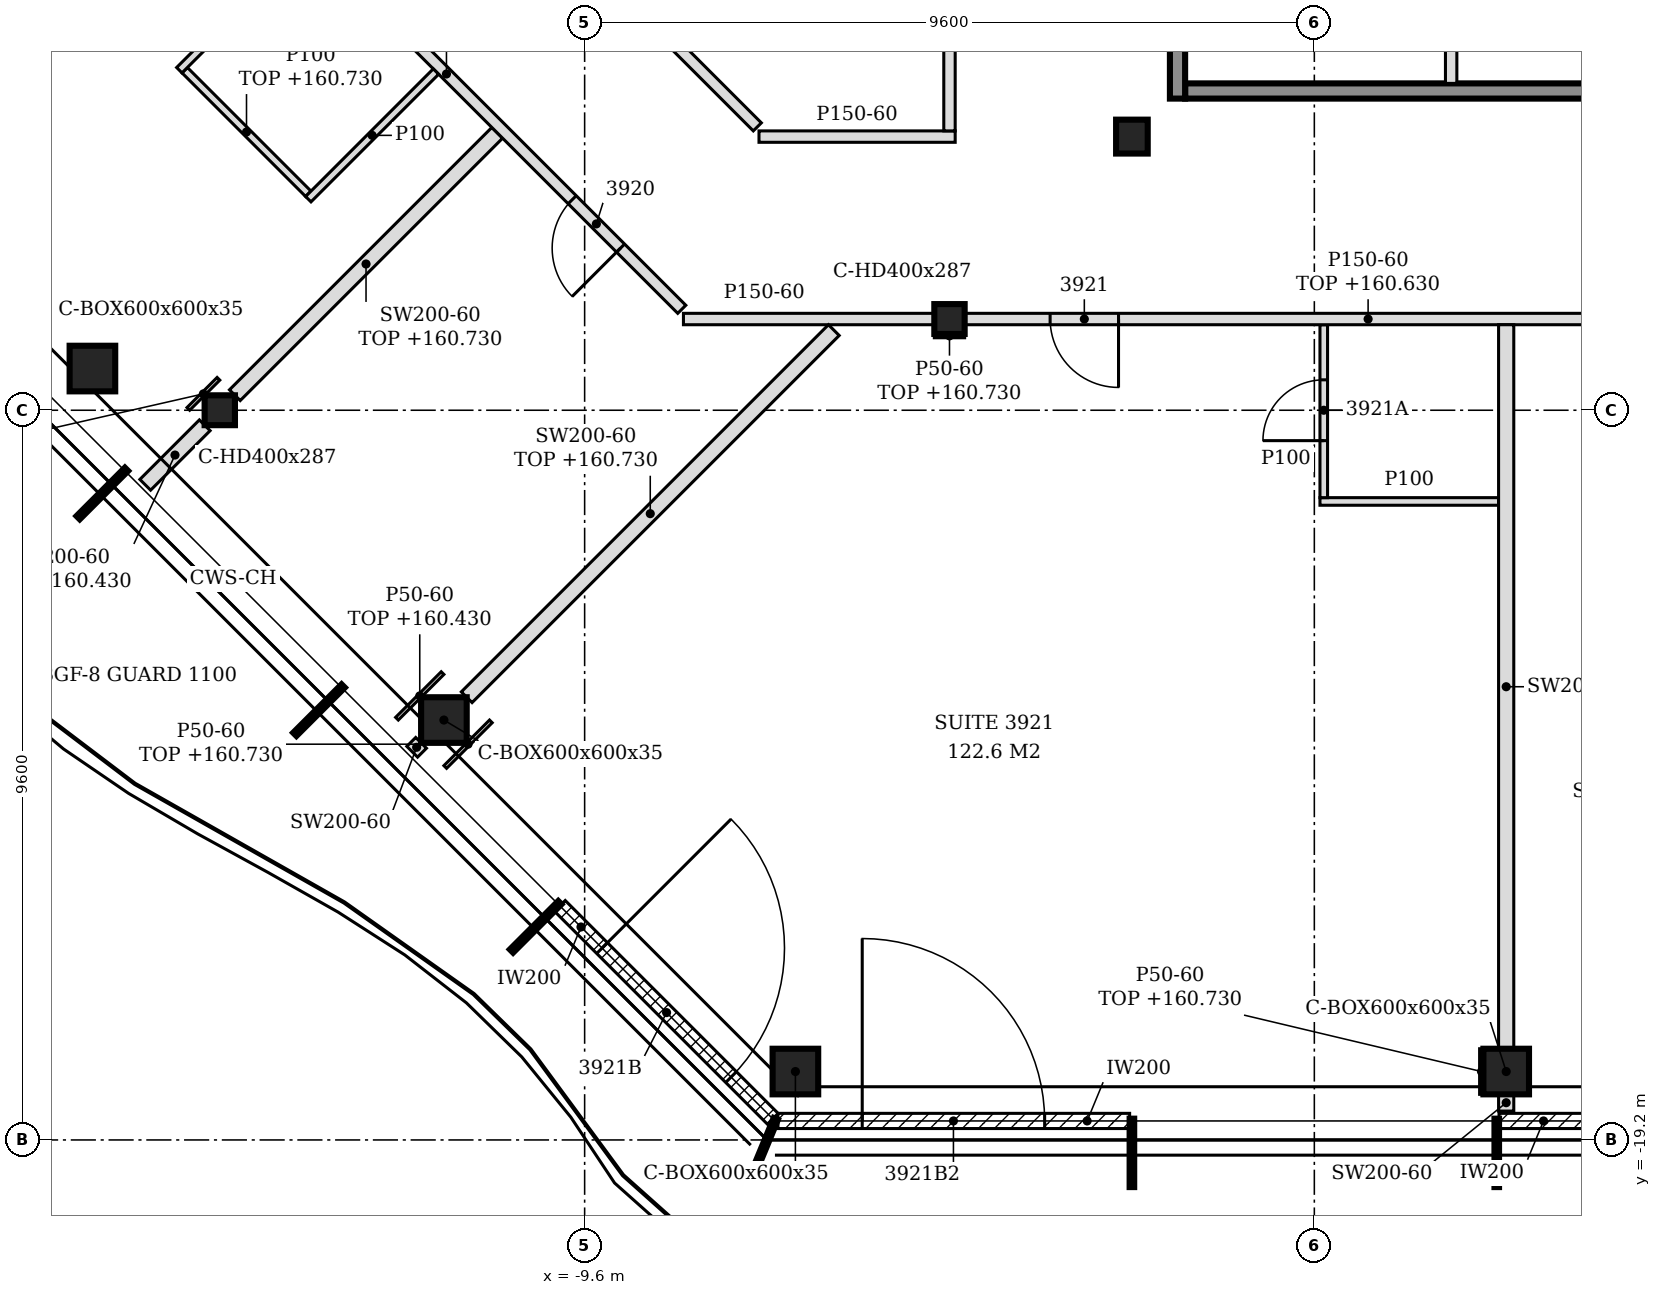
"""IFC4 building model, lengths in metres.
Left out: names, types, materials, properties, quantities, classifications, styles, units other than length and angle.
Written with IfcOpenShell. Run it as: python <this file> out.ifc"""

import sys

from ifc_helpers import new_model, si_unit, direction, frame, frame_2d, origin, origin_2d, place, context, subcontext, project, spatial, polyline, rectangle, hollow_rectangle, i_section, outline, extrude, element, fill, save


model = new_model("IFC4")
c1 = context("Model", 3, precision=1e-05, world=origin(), true_north=direction((0.0, 1.0)))
c2 = subcontext(c1, "Body", "Model", "MODEL_VIEW")
j1 = project(units=[si_unit("LENGTHUNIT", "METRE"), si_unit("PLANEANGLEUNIT", "RADIAN")], contexts=[c1])
p1 = place(None, origin())
s1 = spatial("IfcSite", under=j1, at=p1, CompositionType="ELEMENT")
p2 = place(p1, origin())
s2 = spatial("IfcBuilding", under=s1, at=p2, CompositionType="ELEMENT")
p3 = place(p2, frame((0.0, 0.0, 157.8)))
s3 = spatial("IfcBuildingStorey", under=s2, at=p3, CompositionType="ELEMENT", Elevation=157.8)
for number, where, z_axis, x_axis in (
    (1, (-6.827, -18.3, -0.15), (0.0, 0.0, 1.0), (1.0, 0.0, 0.0)),
    (2, (2.524, -18.3, -0.15), (0.0, 0.0, 1.0), (1.0, 0.0, 0.0)),
    (3, (-16.076, -9.052, -0.15), (0.0, 0.0, 1.0), (1.0, 0.0, 0.0)),
    (4, (-11.451, -13.676, -0.15), (0.0, 0.0, 1.0), (1.0, 0.0, 0.0)),
):
    element("IfcColumn", number, at=place(p3, frame(where, z_axis=z_axis, x_axis=x_axis)), inside=s3, PredefinedType="COLUMN", context=c2, shape_type="SweptSolid", body=[
        extrude(hollow_rectangle(XDim=0.6, YDim=0.6, WallThickness=0.035, at=origin_2d()), origin(), (0.0, 0.0, 1.0), 3.6),
    ])
p4 = place(p3, frame((-4.8, -8.4, -0.15), z_axis=(0.0, 0.0, 1.0), x_axis=(1.0, 0.0, 0.0)))
e5 = element("IfcColumn", 5, at=p4, inside=s3, PredefinedType="COLUMN", context=c2, shape_type="SweptSolid", body=[
    extrude(i_section(OverallWidth=0.399, OverallDepth=0.393, WebThickness=0.023, FlangeThickness=0.037, FilletRadius=0.015, at=origin_2d()), origin(), (0.0, 0.0, 1.0), 3.6),
])
p5 = place(p3, frame((-2.4, -6.0, -0.15), z_axis=(0.0, 0.0, 1.0), x_axis=(1.0, 0.0, 0.0)))
e6 = element("IfcColumn", 6, at=p5, inside=s3, PredefinedType="COLUMN", context=c2, shape_type="SweptSolid", body=[
    extrude(i_section(OverallWidth=0.416, OverallDepth=0.446, WebThickness=0.039, FlangeThickness=0.063, FilletRadius=0.015, at=origin_2d()), origin(), (0.0, 0.0, 1.0), 3.6),
])
p6 = place(p3, frame((-14.4, -9.6, -0.15), z_axis=(0.0, 0.0, 1.0), x_axis=(1.0, 0.0, 0.0)))
e7 = element("IfcColumn", 7, at=p6, inside=s3, PredefinedType="COLUMN", context=c2, shape_type="SweptSolid", body=[
    extrude(i_section(OverallWidth=0.399, OverallDepth=0.393, WebThickness=0.023, FlangeThickness=0.037, FilletRadius=0.015, at=origin_2d()), origin(), (0.0, 0.0, 1.0), 3.6),
])
p7 = place(p3, frame((-7.056, -18.95, 0.0), z_axis=(0.0, 0.0, 1.0), x_axis=(1.0, 0.0, 0.0)))
e8 = element("IfcWall", 8, at=p7, inside=s3, PredefinedType="NOTDEFINED", context=c2, shape_type="SweptSolid", body=[
    extrude(rectangle(XDim=4.626, YDim=0.2, at=frame_2d((2.313, 0.0))), origin(), (0.0, 0.0, 1.0), 3.45),
])
p8 = place(p7, frame((1.108, 0.0, 0.0)))
e9 = element("IfcOpeningElement", 9, at=p8, cuts=e8, PredefinedType="OPENING", context=c2, shape_type="SweptSolid", body=[
    extrude(rectangle(XDim=2.4, YDim=2.4, at=frame_2d((1.2, 1.2))), frame((0.0, 0.11, 0.0), z_axis=(0.0, -1.0, 0.0), x_axis=(1.0, 0.0, 0.0)), (0.0, 0.0, 1.0), 0.22),
])
p9 = place(p3, frame((2.43, -18.95, 0.0), z_axis=(0.0, 0.0, 1.0), x_axis=(1.0, 0.0, 0.0)))
e10 = element("IfcWall", 10, at=p9, inside=s3, PredefinedType="NOTDEFINED", context=c2, shape_type="SweptSolid", body=[
    extrude(rectangle(XDim=4.74, YDim=0.2, at=frame_2d((2.37, 0.0))), origin(), (0.0, 0.0, 1.0), 3.45),
])
p10 = place(p9, frame((1.17, 0.0, 0.0)))
e11 = element("IfcOpeningElement", 11, at=p10, cuts=e10, PredefinedType="OPENING", context=c2, shape_type="SweptSolid", body=[
    extrude(rectangle(XDim=2.4, YDim=2.4, at=frame_2d((1.2, 1.2))), frame((0.0, 0.11, 0.0), z_axis=(0.0, -1.0, 0.0), x_axis=(1.0, 0.0, 0.0)), (0.0, 0.0, 1.0), 0.22),
])
p11 = place(p3, frame((-9.926, -16.121, 0.0), z_axis=(0.0, 0.0, 1.0), x_axis=(0.707137595296, -0.707075965734, 0.0)))
e12 = element("IfcWall", 12, at=p11, inside=s3, PredefinedType="NOTDEFINED", context=c2, shape_type="SweptSolid", body=[
    extrude(rectangle(XDim=3.961, YDim=0.2, at=frame_2d((1.981, 0.0))), origin(), (0.0, 0.0, 1.0), 3.45),
])
p12 = place(p11, frame((0.786, 0.0, 0.0)))
e13 = element("IfcOpeningElement", 13, at=p12, cuts=e12, PredefinedType="OPENING", context=c2, shape_type="SweptSolid", body=[
    extrude(rectangle(XDim=2.4, YDim=2.4, at=frame_2d((1.2, 1.2))), frame((0.0, 0.11, 0.0), z_axis=(0.0, -1.0, 0.0), x_axis=(1.0, 0.0, 0.0)), (0.0, 0.0, 1.0), 0.22),
])
p13 = place(p3, frame((-1.7, -5.4, 0.0), z_axis=(0.0, 0.0, 1.0), x_axis=(1.0, 0.0, 0.0)))
e14 = element("IfcWall", 14, at=p13, inside=s3, PredefinedType="SOLIDWALL", context=c2, shape_type="SweptSolid", body=[
    extrude(rectangle(XDim=7.9, YDim=0.2, at=frame_2d((3.95, 0.0))), origin(), (0.0, 0.0, 1.0), 3.45),
])
p14 = place(p3, frame((-1.8, -5.5, 0.0), z_axis=(0.0, 0.0, 1.0), x_axis=(0.0, 1.0, 0.0)))
e15 = element("IfcWall", 15, at=p14, inside=s3, PredefinedType="SOLIDWALL", context=c2, shape_type="SweptSolid", body=[
    extrude(rectangle(XDim=15.8, YDim=0.2, at=frame_2d((7.9, 0.0))), origin(), (0.0, 0.0, 1.0), 3.45),
])
p15 = place(p14, frame((3.05, 0.0, 0.0)))
e16 = element("IfcOpeningElement", 16, at=p15, cuts=e15, PredefinedType="OPENING", context=c2, shape_type="SweptSolid", body=[
    extrude(rectangle(XDim=1.3, YDim=2.1, at=frame_2d((0.65, 1.05))), frame((0.0, 0.11, 0.0), z_axis=(0.0, -1.0, 0.0), x_axis=(1.0, 0.0, 0.0)), (0.0, 0.0, 1.0), 0.22),
])
p16 = place(p14, frame((11.45, 0.0, 0.0)))
e17 = element("IfcOpeningElement", 17, at=p16, cuts=e15, PredefinedType="OPENING", context=c2, shape_type="SweptSolid", body=[
    extrude(rectangle(XDim=1.3, YDim=2.1, at=frame_2d((0.65, 1.05))), frame((0.0, 0.11, 0.0), z_axis=(0.0, -1.0, 0.0), x_axis=(1.0, 0.0, 0.0)), (0.0, 0.0, 1.0), 0.22),
])
p17 = place(p3, frame((1.8, -5.3, 0.0), z_axis=(0.0, 0.0, 1.0), x_axis=(0.0, 1.0, 0.0)))
e18 = element("IfcWall", 18, at=p17, inside=s3, PredefinedType="PARTITIONING", context=c2, shape_type="SweptSolid", body=[
    extrude(rectangle(XDim=2.525, YDim=0.15, at=frame_2d((1.263, 0.0))), origin(), (0.0, 0.0, 1.0), 3.45),
])
p18 = place(p3, frame((2.524, -18.82, 0.0), z_axis=(0.0, 0.0, 1.0), x_axis=(0.0, 1.0, 0.0)))
e19 = element("IfcWall", 19, at=p18, inside=s3, PredefinedType="PARTITIONING", context=c2, shape_type="SweptSolid", body=[
    extrude(rectangle(XDim=0.22, YDim=0.2, at=frame_2d((0.11, 0.0))), origin(), (0.0, 0.0, 1.0), 3.45),
])
p19 = place(p3, frame((2.524, -18.0, 0.0), z_axis=(0.0, 0.0, 1.0), x_axis=(0.0, 1.0, 0.0)))
e20 = element("IfcWall", 20, at=p19, inside=s3, PredefinedType="PARTITIONING", context=c2, shape_type="SweptSolid", body=[
    extrude(outline(polyline([(0.0, 0.0), (9.525, 0.0), (9.525, 2.83), (9.45, 2.83), (9.448, 3.45), (3.705, 3.45), (3.703, 2.88), (3.495, 2.88), (3.493, 3.45), (0.0, 3.45), (0.0, 0.0)])), frame((0.0, 0.1, 0.0), z_axis=(0.0, -1.0, 0.0), x_axis=(1.0, 0.0, 0.0)), (0.0, 0.0, 1.0), 0.2),
])
p20 = place(p3, frame((-11.869, -14.093, 0.0), z_axis=(0.0, 0.0, 1.0), x_axis=(0.707106781187, 0.707106781187, 0.0)))
e21 = element("IfcWall", 21, at=p20, inside=s3, PredefinedType="PARTITIONING", context=c2, shape_type="SweptSolid", body=[
    extrude(rectangle(XDim=0.166, YDim=0.2, at=frame_2d((0.083, 0.0))), origin(), (0.0, 0.0, 1.0), 3.45),
])
p21 = place(p3, frame((-11.152, -13.375, 0.0), z_axis=(0.0, 0.0, 1.0), x_axis=(0.707106781187, 0.707106781187, 0.0)))
e22 = element("IfcWall", 22, at=p21, inside=s3, PredefinedType="PARTITIONING", context=c2, shape_type="SweptSolid", body=[
    extrude(rectangle(XDim=6.83, YDim=0.2, at=frame_2d((3.415, 0.0))), origin(), (0.0, 0.0, 1.0), 2.93),
])
p22 = place(p3, frame((0.074, -10.8, 0.0), z_axis=(0.0, 0.0, 1.0), x_axis=(1.0, 0.0, 0.0)))
e23 = element("IfcWall", 23, at=p22, inside=s3, PredefinedType="PARTITIONING", context=c2, shape_type="SweptSolid", body=[
    extrude(rectangle(XDim=2.35, YDim=0.1, at=frame_2d((1.175, 0.0))), origin(), (0.0, 0.0, 1.0), 3.45),
])
p23 = place(p3, frame((0.124, -10.75, 0.0), z_axis=(0.0, 0.0, 1.0), x_axis=(0.0, 1.0, 0.0)))
e24 = element("IfcWall", 24, at=p23, inside=s3, PredefinedType="PARTITIONING", context=c2, shape_type="SweptSolid", body=[
    extrude(outline(polyline([(0.0, 0.0), (2.275, 0.0), (2.275, 2.83), (2.2, 2.83), (2.198, 3.45), (0.0, 3.45), (0.0, 0.0)])), frame((0.0, 0.05, 0.0), z_axis=(0.0, -1.0, 0.0), x_axis=(1.0, 0.0, 0.0)), (0.0, 0.0, 1.0), 0.1),
])
p24 = place(p23, frame((0.75, 0.0, 0.0)))
e25 = element("IfcOpeningElement", 25, at=p24, cuts=e24, PredefinedType="OPENING", context=c2, shape_type="SweptSolid", body=[
    extrude(rectangle(XDim=0.8, YDim=2.1, at=frame_2d((0.4, 1.05))), frame((0.0, 0.06, 0.0), z_axis=(0.0, -1.0, 0.0), x_axis=(1.0, 0.0, 0.0)), (0.0, 0.0, 1.0), 0.12),
])
p25 = place(p3, frame((-15.381, -10.581, 0.0), z_axis=(0.0, 0.0, 1.0), x_axis=(0.707217034054, 0.706996511125, 0.0)))
e26 = element("IfcWall", 26, at=p25, inside=s3, PredefinedType="PARTITIONING", context=c2, shape_type="SweptSolid", body=[
    extrude(rectangle(XDim=1.107, YDim=0.2, at=frame_2d((0.554, 0.0))), origin(), (0.0, 0.0, 1.0), 2.63),
])
p26 = place(p3, frame((-14.202, -9.402, 0.0), z_axis=(0.0, 0.0, 1.0), x_axis=(0.707081776084, 0.707131785404, 0.0)))
e27 = element("IfcWall", 27, at=p26, inside=s3, PredefinedType="PARTITIONING", context=c2, shape_type="SweptSolid", body=[
    extrude(rectangle(XDim=4.882, YDim=0.2, at=frame_2d((2.441, 0.0))), origin(), (0.0, 0.0, 1.0), 2.93),
])
p27 = place(p3, frame((-8.3, -8.4, 0.0), z_axis=(0.0, 0.0, 1.0), x_axis=(1.0, 0.0, 0.0)))
e28 = element("IfcWall", 28, at=p27, inside=s3, PredefinedType="PARTITIONING", context=c2, shape_type="SweptSolid", body=[
    extrude(rectangle(XDim=3.301, YDim=0.15, at=frame_2d((1.65, 0.0))), origin(), (0.0, 0.0, 1.0), 3.45),
])
p28 = place(p3, frame((-4.601, -8.4, 0.0), z_axis=(0.0, 0.0, 1.0), x_axis=(1.0, 0.0, 0.0)))
e29 = element("IfcWall", 29, at=p28, inside=s3, PredefinedType="PARTITIONING", context=c2, shape_type="SweptSolid", body=[
    extrude(rectangle(XDim=11.601, YDim=0.15, at=frame_2d((5.801, 0.0))), origin(), (0.0, 0.0, 1.0), 2.83),
])
p29 = place(p28, frame((1.125, 0.0, 0.0)))
e30 = element("IfcOpeningElement", 30, at=p29, cuts=e29, PredefinedType="OPENING", context=c2, shape_type="SweptSolid", body=[
    extrude(rectangle(XDim=0.9, YDim=2.1, at=frame_2d((0.45, 1.05))), frame((0.0, 0.085, 0.0), z_axis=(0.0, -1.0, 0.0), x_axis=(1.0, 0.0, 0.0)), (0.0, 0.0, 1.0), 0.17),
])
p30 = place(p28, frame((8.592, 0.0, 0.0)))
e31 = element("IfcOpeningElement", 31, at=p30, cuts=e29, PredefinedType="OPENING", context=c2, shape_type="SweptSolid", body=[
    extrude(rectangle(XDim=0.9, YDim=2.1, at=frame_2d((0.45, 1.05))), frame((0.0, 0.085, 0.0), z_axis=(0.0, -1.0, 0.0), x_axis=(1.0, 0.0, 0.0)), (0.0, 0.0, 1.0), 0.17),
])
p31 = place(p3, frame((-8.322, -8.272, 0.0), z_axis=(0.0, 0.0, 1.0), x_axis=(-0.707106781187, 0.707106781187, 0.0)))
e32 = element("IfcWall", 32, at=p31, inside=s3, PredefinedType="PARTITIONING", context=c2, shape_type="SweptSolid", body=[
    extrude(rectangle(XDim=6.718, YDim=0.15, at=frame_2d((3.359, 0.0))), origin(), (0.0, 0.0, 1.0), 2.93),
])
p32 = place(p31, frame((1.139, 0.0, 0.0)))
e33 = element("IfcOpeningElement", 33, at=p32, cuts=e32, PredefinedType="OPENING", context=c2, shape_type="SweptSolid", body=[
    extrude(rectangle(XDim=0.9, YDim=2.1, at=frame_2d((0.45, 1.05))), frame((0.0, 0.085, 0.0), z_axis=(0.0, -1.0, 0.0), x_axis=(1.0, 0.0, 0.0)), (0.0, 0.0, 1.0), 0.17),
])
p33 = place(p3, frame((-13.235, -6.753, 0.0), z_axis=(0.0, 0.0, 1.0), x_axis=(-0.707106781187, 0.707106781187, 0.0)))
e34 = element("IfcWall", 34, at=p33, inside=s3, PredefinedType="PARTITIONING", context=c2, shape_type="SweptSolid", body=[
    extrude(rectangle(XDim=2.3, YDim=0.1, at=frame_2d((1.15, 0.0))), origin(), (0.0, 0.0, 1.0), 2.93),
])
p34 = place(p3, frame((-13.235, -6.823, 0.0), z_axis=(0.0, 0.0, 1.0), x_axis=(0.707106781187, 0.707106781187, 0.0)))
e35 = element("IfcWall", 35, at=p34, inside=s3, PredefinedType="PARTITIONING", context=c2, shape_type="SweptSolid", body=[
    extrude(rectangle(XDim=2.375, YDim=0.1, at=frame_2d((1.188, 0.0))), origin(), (0.0, 0.0, 1.0), 3.45),
])
p35 = place(p3, frame((-7.306, -6.0, 0.0), z_axis=(0.0, 0.0, 1.0), x_axis=(1.0, 0.0, 0.0)))
e36 = element("IfcWall", 36, at=p35, inside=s3, PredefinedType="PARTITIONING", context=c2, shape_type="SweptSolid", body=[
    extrude(outline(polyline([(0.0, 0.0), (2.581, 0.0), (2.581, 2.83), (2.356, 2.83), (2.354, 3.45), (0.0, 3.45), (0.0, 0.0)])), frame((0.0, 0.075, 0.0), z_axis=(0.0, -1.0, 0.0), x_axis=(1.0, 0.0, 0.0)), (0.0, 0.0, 1.0), 0.15),
])
p36 = place(p3, frame((-7.328, -5.872, 0.0), z_axis=(0.0, 0.0, 1.0), x_axis=(-0.707106781187, 0.707106781187, 0.0)))
e37 = element("IfcWall", 37, at=p36, inside=s3, PredefinedType="PARTITIONING", context=c2, shape_type="SweptSolid", body=[
    extrude(rectangle(XDim=4.729, YDim=0.15, at=frame_2d((2.365, 0.0))), origin(), (0.0, 0.0, 1.0), 2.93),
])
p37 = place(p3, frame((-4.8, -5.925, 0.0), z_axis=(0.0, 0.0, 1.0), x_axis=(0.0, 1.0, 0.0)))
e38 = element("IfcWall", 38, at=p37, inside=s3, PredefinedType="PARTITIONING", context=c2, shape_type="SweptSolid", body=[
    extrude(rectangle(XDim=8.129, YDim=0.15, at=frame_2d((4.064, 0.0))), origin(), (0.0, 0.0, 1.0), 2.83),
])
p38 = place(p3, frame((-14.932, -5.126, 0.0), z_axis=(0.0, 0.0, 1.0), x_axis=(0.707106781187, 0.707106781187, 0.0)))
e39 = element("IfcWall", 39, at=p38, inside=s3, PredefinedType="PARTITIONING", context=c2, shape_type="SweptSolid", body=[
    extrude(rectangle(XDim=2.294, YDim=0.1, at=frame_2d((1.147, 0.0))), origin(), (0.0, 0.0, 1.0), 2.93),
])
p39 = place(p38, frame((0.85, 0.0, 0.0)))
e40 = element("IfcOpeningElement", 40, at=p39, cuts=e39, PredefinedType="OPENING", context=c2, shape_type="SweptSolid", body=[
    extrude(rectangle(XDim=0.8, YDim=2.1, at=frame_2d((0.4, 1.05))), frame((0.0, 0.06, 0.0), z_axis=(0.0, -1.0, 0.0), x_axis=(1.0, 0.0, 0.0)), (0.0, 0.0, 1.0), 0.12),
])
p40 = place(p3, frame((2.199, -18.6, 0.0), z_axis=(0.0, 0.0, 1.0), x_axis=(0.0, 1.0, 0.0)))
e41 = element("IfcWall", 41, at=p40, inside=s3, PredefinedType="PARTITIONING", context=c2, shape_type="SweptSolid", body=[
    extrude(rectangle(XDim=0.6, YDim=0.05, at=frame_2d((0.3, 0.0))), origin(), (0.0, 0.0, 1.0), 2.93),
])
p41 = place(p3, frame((-12.069, -13.658, 0.0), z_axis=(0.0, 0.0, 1.0), x_axis=(0.707106781187, 0.707106781187, 0.0)))
e42 = element("IfcWall", 42, at=p41, inside=s3, PredefinedType="PARTITIONING", context=c2, shape_type="SweptSolid", body=[
    extrude(rectangle(XDim=0.848, YDim=0.05, at=frame_2d((0.424, 0.0))), origin(), (0.0, 0.0, 1.0), 2.63),
])
p42 = place(p3, frame((-11.434, -14.293, 0.0), z_axis=(0.0, 0.0, 1.0), x_axis=(0.707106781187, 0.707106781187, 0.0)))
e43 = element("IfcWall", 43, at=p42, inside=s3, PredefinedType="PARTITIONING", context=c2, shape_type="SweptSolid", body=[
    extrude(rectangle(XDim=0.849, YDim=0.05, at=frame_2d((0.424, 0.0))), origin(), (0.0, 0.0, 1.0), 2.93),
])
p43 = place(p3, frame((-14.814, -9.582, 0.0), z_axis=(0.0, 0.0, 1.0), x_axis=(0.707106781187, 0.707106781187, 0.0)))
e44 = element("IfcWall", 44, at=p43, inside=s3, PredefinedType="PARTITIONING", context=c2, shape_type="SweptSolid", body=[
    extrude(rectangle(XDim=0.56, YDim=0.05, at=frame_2d((0.28, 0.0))), origin(), (0.0, 0.0, 1.0), 2.93),
])
p44 = place(p3, frame((-5.0, -8.622, 0.0), z_axis=(0.0, 0.0, 1.0), x_axis=(1.0, 0.0, 0.0)))
e45 = element("IfcWall", 45, at=p44, inside=s3, PredefinedType="PARTITIONING", context=c2, shape_type="SweptSolid", body=[
    extrude(rectangle(XDim=0.399, YDim=0.05, at=frame_2d((0.199, 0.0))), origin(), (0.0, 0.0, 1.0), 2.93),
])
p45 = place(p8, origin())
e46 = element("IfcDoor", 46, at=p45, inside=s3, OperationType="SINGLE_SWING_LEFT", PredefinedType="DOOR", context=c2, shape_type="SweptSolid", body=[
    extrude(rectangle(XDim=2.4, YDim=2.4, at=frame_2d((1.2, 1.2))), frame((0.0, 0.025, 0.0), z_axis=(0.0, -1.0, 0.0), x_axis=(1.0, 0.0, 0.0)), (0.0, 0.0, 1.0), 0.05),
])
fill(e9, e46)
p46 = place(p12, origin())
e47 = element("IfcDoor", 47, at=p46, inside=s3, OperationType="SINGLE_SWING_LEFT", PredefinedType="DOOR", context=c2, shape_type="SweptSolid", body=[
    extrude(rectangle(XDim=2.4, YDim=2.4, at=frame_2d((1.2, 1.2))), frame((0.0, 0.025, 0.0), z_axis=(0.0, -1.0, 0.0), x_axis=(1.0, 0.0, 0.0)), (0.0, 0.0, 1.0), 0.05),
])
fill(e13, e47)
p47 = place(p32, origin())
e48 = element("IfcDoor", 48, at=p47, inside=s3, OperationType="SINGLE_SWING_LEFT", PredefinedType="DOOR", context=c2, shape_type="SweptSolid", body=[
    extrude(rectangle(XDim=0.9, YDim=2.1, at=frame_2d((0.45, 1.05))), frame((0.0, 0.025, 0.0), z_axis=(0.0, -1.0, 0.0), x_axis=(1.0, 0.0, 0.0)), (0.0, 0.0, 1.0), 0.05),
])
fill(e33, e48)
p48 = place(p29, frame((0.9, 0.0, 0.0), z_axis=(0.0, 0.0, 1.0), x_axis=(-1.0, 0.0, 0.0)))
e49 = element("IfcDoor", 49, at=p48, inside=s3, OperationType="SINGLE_SWING_LEFT", PredefinedType="DOOR", context=c2, shape_type="SweptSolid", body=[
    extrude(rectangle(XDim=0.9, YDim=2.1, at=frame_2d((0.45, 1.05))), frame((0.0, 0.025, 0.0), z_axis=(0.0, -1.0, 0.0), x_axis=(1.0, 0.0, 0.0)), (0.0, 0.0, 1.0), 0.05),
])
fill(e30, e49)
p49 = place(p24, origin())
e50 = element("IfcDoor", 50, at=p49, inside=s3, OperationType="SINGLE_SWING_LEFT", PredefinedType="DOOR", context=c2, shape_type="SweptSolid", body=[
    extrude(rectangle(XDim=0.8, YDim=2.1, at=frame_2d((0.4, 1.05))), frame((0.0, 0.025, 0.0), z_axis=(0.0, -1.0, 0.0), x_axis=(1.0, 0.0, 0.0)), (0.0, 0.0, 1.0), 0.05),
])
fill(e25, e50)
save(model, sys.argv[1])
